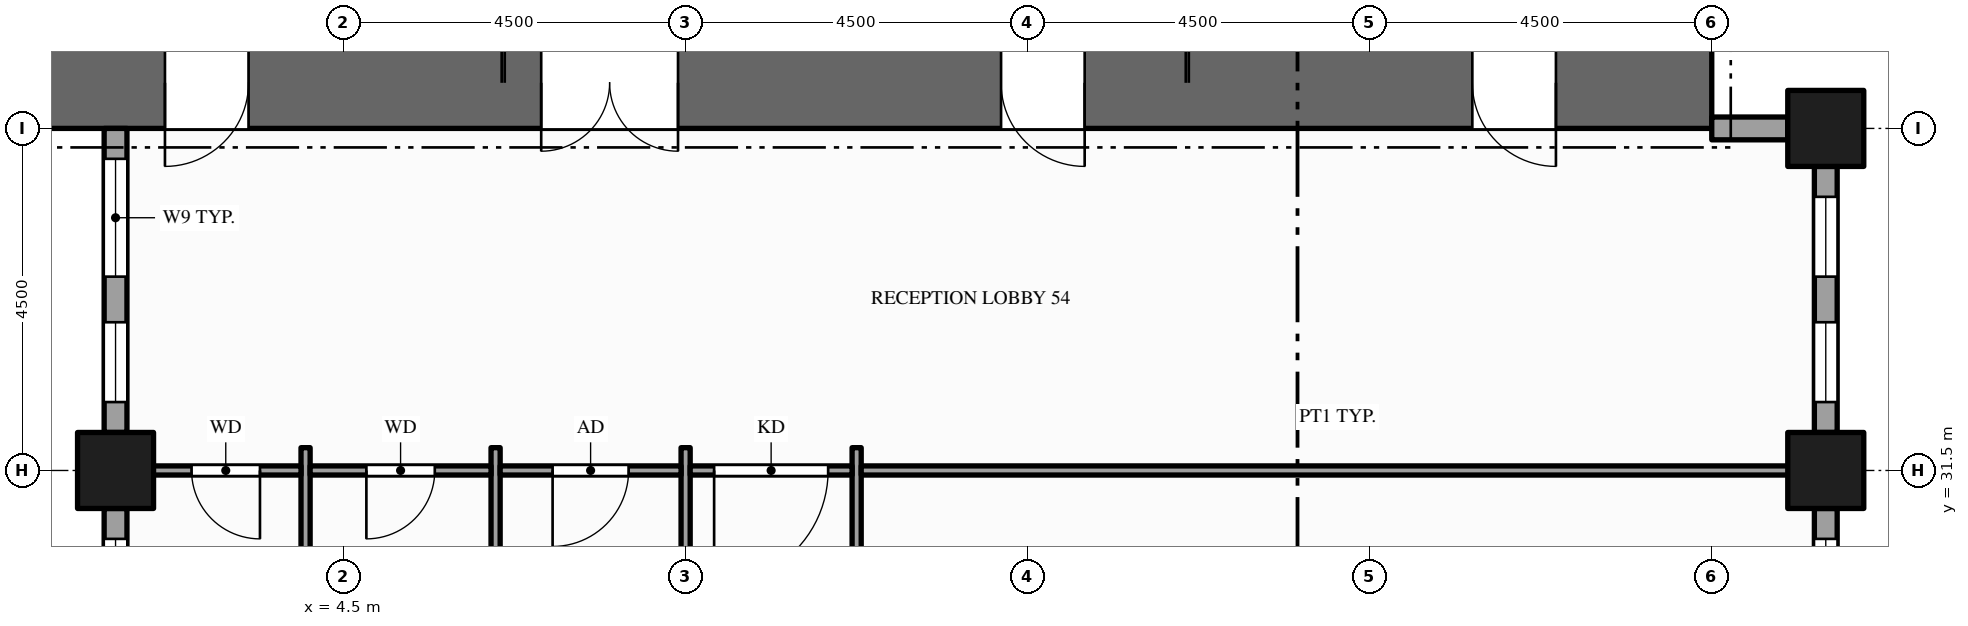
"""IFC4 building model, lengths in metres.
Left out: names, types, materials, properties, quantities, classifications, styles, units other than length and angle.
Written with IfcOpenShell. Run it as: python <this file> out.ifc"""

import sys

from ifc_helpers import new_model, si_unit, direction, frame, frame_2d, origin, origin_2d, place, context, subcontext, project, spatial, rectangle, hollow_rectangle, extrude, element, fill, save


model = new_model("IFC4")
c1 = context("Model", 3, precision=1e-05, world=origin(), true_north=direction((0.0, 1.0)))
c2 = subcontext(c1, "Body", "Model", "MODEL_VIEW")
j1 = project(units=[si_unit("LENGTHUNIT", "METRE"), si_unit("PLANEANGLEUNIT", "RADIAN")], contexts=[c1])
p1 = place(None, origin())
s1 = spatial("IfcSite", under=j1, at=p1, CompositionType="ELEMENT")
p2 = place(p1, origin())
s2 = spatial("IfcBuilding", under=s1, at=p2, CompositionType="ELEMENT")
p3 = place(p2, frame((0.0, 0.0, 123.0)))
s3 = spatial("IfcBuildingStorey", under=s2, at=p3, CompositionType="ELEMENT", Elevation=123.0)
p4 = place(p3, frame((0.0, 36.6, -0.15), z_axis=(0.0, 0.0, 1.0), x_axis=(1.0, 0.0, 0.0)))
e1 = element("IfcWall", 1, at=p4, inside=s3, PredefinedType="SHEAR", context=c2, shape_type="SweptSolid", body=[
    extrude(rectangle(XDim=22.5, YDim=1.2, at=frame_2d((11.25, 0.0))), origin(), (0.0, 0.0, 1.0), 4.0),
])
p5 = place(p4, frame((7.1, 0.0, 0.15)))
e2 = element("IfcOpeningElement", 2, at=p5, cuts=e1, PredefinedType="OPENING", context=c2, shape_type="SweptSolid", body=[
    extrude(rectangle(XDim=1.8, YDim=2.1, at=frame_2d((0.9, 1.05))), frame((0.0, 0.61, 0.0), z_axis=(0.0, -1.0, 0.0), x_axis=(1.0, 0.0, 0.0)), (0.0, 0.0, 1.0), 1.22),
])
p6 = place(p4, frame((13.15, 0.0, 0.15)))
e3 = element("IfcOpeningElement", 3, at=p6, cuts=e1, PredefinedType="OPENING", context=c2, shape_type="SweptSolid", body=[
    extrude(rectangle(XDim=1.1, YDim=2.1, at=frame_2d((0.55, 1.05))), frame((0.0, 0.61, 0.0), z_axis=(0.0, -1.0, 0.0), x_axis=(1.0, 0.0, 0.0)), (0.0, 0.0, 1.0), 1.22),
])
p7 = place(p4, frame((2.15, 0.0, 0.15)))
e4 = element("IfcOpeningElement", 4, at=p7, cuts=e1, PredefinedType="OPENING", context=c2, shape_type="SweptSolid", body=[
    extrude(rectangle(XDim=1.1, YDim=2.1, at=frame_2d((0.55, 1.05))), frame((0.0, 0.61, 0.0), z_axis=(0.0, -1.0, 0.0), x_axis=(1.0, 0.0, 0.0)), (0.0, 0.0, 1.0), 1.22),
])
p8 = place(p4, frame((19.35, 0.0, 0.15)))
e5 = element("IfcOpeningElement", 5, at=p8, cuts=e1, PredefinedType="OPENING", context=c2, shape_type="SweptSolid", body=[
    extrude(rectangle(XDim=1.1, YDim=2.1, at=frame_2d((0.55, 1.05))), frame((0.0, 0.61, 0.0), z_axis=(0.0, -1.0, 0.0), x_axis=(1.0, 0.0, 0.0)), (0.0, 0.0, 1.0), 1.22),
])
for number, where, z_axis, x_axis in (
    (6, (1.5, 31.5, -0.15), (0.0, 0.0, 1.0), (1.0, 0.0, 0.0)),
    (7, (24.0, 31.5, -0.15), (0.0, 0.0, 1.0), (1.0, 0.0, 0.0)),
    (8, (24.0, 36.0, -0.15), (0.0, 0.0, 1.0), (1.0, 0.0, 0.0)),
):
    element("IfcColumn", number, at=place(p3, frame(where, z_axis=z_axis, x_axis=x_axis)), inside=s3, PredefinedType="COLUMN", context=c2, shape_type="SweptSolid", body=[
        extrude(hollow_rectangle(XDim=1.0, YDim=1.0, WallThickness=0.05, at=origin_2d()), origin(), (0.0, 0.0, 1.0), 4.0),
    ])
p9 = place(p3, frame((24.0, 26.0, 0.0), z_axis=(0.0, 0.0, 1.0), x_axis=(0.0, 1.0, 0.0)))
e9 = element("IfcWall", 9, at=p9, inside=s3, PredefinedType="STANDARD", context=c2, shape_type="SweptSolid", body=[
    extrude(rectangle(XDim=5.0, YDim=0.3, at=frame_2d((2.5, 0.0))), origin(), (0.0, 0.0, 1.0), 3.154),
])
p10 = place(p9, frame((1.3, 0.0, 0.9)))
e10 = element("IfcOpeningElement", 10, at=p10, cuts=e9, PredefinedType="OPENING", context=c2, shape_type="SweptSolid", body=[
    extrude(rectangle(XDim=1.65, YDim=2.0, at=frame_2d((0.825, 1.0))), frame((0.0, 0.16, 0.0), z_axis=(0.0, -1.0, 0.0), x_axis=(1.0, 0.0, 0.0)), (0.0, 0.0, 1.0), 0.32),
])
p11 = place(p9, frame((3.55, 0.0, 0.9)))
e11 = element("IfcOpeningElement", 11, at=p11, cuts=e9, PredefinedType="OPENING", context=c2, shape_type="SweptSolid", body=[
    extrude(rectangle(XDim=1.05, YDim=2.0, at=frame_2d((0.525, 1.0))), frame((0.0, 0.16, 0.0), z_axis=(0.0, -1.0, 0.0), x_axis=(1.0, 0.0, 0.0)), (0.0, 0.0, 1.0), 0.32),
])
p12 = place(p3, frame((24.0, 32.0, 0.0), z_axis=(0.0, 0.0, 1.0), x_axis=(0.0, 1.0, 0.0)))
e12 = element("IfcWall", 12, at=p12, inside=s3, PredefinedType="STANDARD", context=c2, shape_type="SweptSolid", body=[
    extrude(rectangle(XDim=3.5, YDim=0.3, at=frame_2d((1.75, 0.0))), origin(), (0.0, 0.0, 1.0), 3.154),
])
p13 = place(p12, frame((0.4, 0.0, 0.9)))
e13 = element("IfcOpeningElement", 13, at=p13, cuts=e12, PredefinedType="OPENING", context=c2, shape_type="SweptSolid", body=[
    extrude(rectangle(XDim=1.05, YDim=2.0, at=frame_2d((0.525, 1.0))), frame((0.0, 0.16, 0.0), z_axis=(0.0, -1.0, 0.0), x_axis=(1.0, 0.0, 0.0)), (0.0, 0.0, 1.0), 0.32),
])
p14 = place(p12, frame((2.05, 0.0, 0.9)))
e14 = element("IfcOpeningElement", 14, at=p14, cuts=e12, PredefinedType="OPENING", context=c2, shape_type="SweptSolid", body=[
    extrude(rectangle(XDim=1.05, YDim=2.0, at=frame_2d((0.525, 1.0))), frame((0.0, 0.16, 0.0), z_axis=(0.0, -1.0, 0.0), x_axis=(1.0, 0.0, 0.0)), (0.0, 0.0, 1.0), 0.32),
])
p15 = place(p3, frame((23.5, 36.0, 0.0), z_axis=(0.0, 0.0, 1.0), x_axis=(-1.0, 0.0, 0.0)))
e15 = element("IfcWall", 15, at=p15, inside=s3, PredefinedType="STANDARD", context=c2, shape_type="SweptSolid", body=[
    extrude(rectangle(XDim=1.0, YDim=0.3, at=frame_2d((0.5, 0.0))), origin(), (0.0, 0.0, 1.0), 2.938),
])
p16 = place(p3, frame((1.5, 36.0, 0.0), z_axis=(0.0, 0.0, 1.0), x_axis=(0.0, -1.0, 0.0)))
e16 = element("IfcWall", 16, at=p16, inside=s3, PredefinedType="STANDARD", context=c2, shape_type="SweptSolid", body=[
    extrude(rectangle(XDim=4.0, YDim=0.3, at=frame_2d((2.0, 0.0))), origin(), (0.0, 0.0, 1.0), 3.154),
])
p17 = place(p16, frame((0.4, 0.0, 0.9)))
e17 = element("IfcOpeningElement", 17, at=p17, cuts=e16, PredefinedType="OPENING", context=c2, shape_type="SweptSolid", body=[
    extrude(rectangle(XDim=1.55, YDim=2.0, at=frame_2d((0.775, 1.0))), frame((0.0, 0.16, 0.0), z_axis=(0.0, -1.0, 0.0), x_axis=(1.0, 0.0, 0.0)), (0.0, 0.0, 1.0), 0.32),
])
p18 = place(p16, frame((2.55, 0.0, 0.9)))
e18 = element("IfcOpeningElement", 18, at=p18, cuts=e16, PredefinedType="OPENING", context=c2, shape_type="SweptSolid", body=[
    extrude(rectangle(XDim=1.05, YDim=2.0, at=frame_2d((0.525, 1.0))), frame((0.0, 0.16, 0.0), z_axis=(0.0, -1.0, 0.0), x_axis=(1.0, 0.0, 0.0)), (0.0, 0.0, 1.0), 0.32),
])
p19 = place(p3, frame((1.5, 31.0, 0.0), z_axis=(0.0, 0.0, 1.0), x_axis=(0.0, -1.0, 0.0)))
e19 = element("IfcWall", 19, at=p19, inside=s3, PredefinedType="STANDARD", context=c2, shape_type="SweptSolid", body=[
    extrude(rectangle(XDim=3.5, YDim=0.3, at=frame_2d((1.75, 0.0))), origin(), (0.0, 0.0, 1.0), 3.154),
])
p20 = place(p19, frame((0.4, 0.0, 0.9)))
e20 = element("IfcOpeningElement", 20, at=p20, cuts=e19, PredefinedType="OPENING", context=c2, shape_type="SweptSolid", body=[
    extrude(rectangle(XDim=1.05, YDim=2.0, at=frame_2d((0.525, 1.0))), frame((0.0, 0.16, 0.0), z_axis=(0.0, -1.0, 0.0), x_axis=(1.0, 0.0, 0.0)), (0.0, 0.0, 1.0), 0.32),
])
p21 = place(p19, frame((2.05, 0.0, 0.9)))
e21 = element("IfcOpeningElement", 21, at=p21, cuts=e19, PredefinedType="OPENING", context=c2, shape_type="SweptSolid", body=[
    extrude(rectangle(XDim=1.05, YDim=2.0, at=frame_2d((0.525, 1.0))), frame((0.0, 0.16, 0.0), z_axis=(0.0, -1.0, 0.0), x_axis=(1.0, 0.0, 0.0)), (0.0, 0.0, 1.0), 0.32),
])
for number, where, z_axis, x_axis in (
    (22, (4.0, 26.7, 0.0), (0.0, 0.0, 1.0), (0.0, 1.0, 0.0)),
    (23, (6.5, 26.7, 0.0), (0.0, 0.0, 1.0), (0.0, 1.0, 0.0)),
):
    element("IfcWall", number, at=place(p3, frame(where, z_axis=z_axis, x_axis=x_axis)), inside=s3, PredefinedType="PARTITIONING", context=c2, shape_type="SweptSolid", body=[
        extrude(rectangle(XDim=5.1, YDim=0.12, at=frame_2d((2.55, 0.0))), origin(), (0.0, 0.0, 1.0), 3.85),
    ])
p22 = place(p3, frame((9.0, 13.2, 0.0), z_axis=(0.0, 0.0, 1.0), x_axis=(0.0, 1.0, 0.0)))
e24 = element("IfcWall", 24, at=p22, inside=s3, PredefinedType="PARTITIONING", context=c2, shape_type="SweptSolid", body=[
    extrude(rectangle(XDim=18.6, YDim=0.12, at=frame_2d((9.3, 0.0))), origin(), (0.0, 0.0, 1.0), 2.6),
])
p23 = place(p22, frame((3.175, 0.0, 0.0)))
e25 = element("IfcOpeningElement", 25, at=p23, cuts=e24, PredefinedType="OPENING", context=c2, shape_type="SweptSolid", body=[
    extrude(rectangle(XDim=1.0, YDim=2.1, at=frame_2d((0.5, 1.05))), frame((0.0, 0.07, 0.0), z_axis=(0.0, -1.0, 0.0), x_axis=(1.0, 0.0, 0.0)), (0.0, 0.0, 1.0), 0.14),
])
p24 = place(p22, frame((9.955, 0.0, 0.0)))
e26 = element("IfcOpeningElement", 26, at=p24, cuts=e24, PredefinedType="OPENING", context=c2, shape_type="SweptSolid", body=[
    extrude(rectangle(XDim=1.0, YDim=2.1, at=frame_2d((0.5, 1.05))), frame((0.0, 0.07, 0.0), z_axis=(0.0, -1.0, 0.0), x_axis=(1.0, 0.0, 0.0)), (0.0, 0.0, 1.0), 0.14),
])
p25 = place(p3, frame((11.25, 13.2, 0.0), z_axis=(0.0, 0.0, 1.0), x_axis=(0.0, 1.0, 0.0)))
e27 = element("IfcWall", 27, at=p25, inside=s3, PredefinedType="PARTITIONING", context=c2, shape_type="SweptSolid", body=[
    extrude(rectangle(XDim=18.6, YDim=0.12, at=frame_2d((9.3, 0.0))), origin(), (0.0, 0.0, 1.0), 2.6),
])
p26 = place(p25, frame((4.2, 0.0, 0.0)))
e28 = element("IfcOpeningElement", 28, at=p26, cuts=e27, PredefinedType="OPENING", context=c2, shape_type="SweptSolid", body=[
    extrude(rectangle(XDim=1.2, YDim=2.1, at=frame_2d((0.6, 1.05))), frame((0.0, 0.07, 0.0), z_axis=(0.0, -1.0, 0.0), x_axis=(1.0, 0.0, 0.0)), (0.0, 0.0, 1.0), 0.14),
])
p27 = place(p3, frame((1.65, 31.5, 0.0), z_axis=(0.0, 0.0, 1.0), x_axis=(1.0, 0.0, 0.0)))
e29 = element("IfcWall", 29, at=p27, inside=s3, PredefinedType="PARTITIONING", context=c2, shape_type="SweptSolid", body=[
    extrude(rectangle(XDim=2.29, YDim=0.12, at=frame_2d((1.145, 0.0))), origin(), (0.0, 0.0, 1.0), 2.938),
])
p28 = place(p27, frame((0.85, 0.0, 0.0)))
e30 = element("IfcOpeningElement", 30, at=p28, cuts=e29, PredefinedType="OPENING", context=c2, shape_type="SweptSolid", body=[
    extrude(rectangle(XDim=0.9, YDim=2.1, at=frame_2d((0.45, 1.05))), frame((0.0, 0.07, 0.0), z_axis=(0.0, -1.0, 0.0), x_axis=(1.0, 0.0, 0.0)), (0.0, 0.0, 1.0), 0.14),
])
p29 = place(p3, frame((4.06, 31.5, 0.0), z_axis=(0.0, 0.0, 1.0), x_axis=(1.0, 0.0, 0.0)))
e31 = element("IfcWall", 31, at=p29, inside=s3, PredefinedType="PARTITIONING", context=c2, shape_type="SweptSolid", body=[
    extrude(rectangle(XDim=2.38, YDim=0.12, at=frame_2d((1.19, 0.0))), origin(), (0.0, 0.0, 1.0), 2.938),
])
p30 = place(p29, frame((0.74, 0.0, 0.0)))
e32 = element("IfcOpeningElement", 32, at=p30, cuts=e31, PredefinedType="OPENING", context=c2, shape_type="SweptSolid", body=[
    extrude(rectangle(XDim=0.9, YDim=2.1, at=frame_2d((0.45, 1.05))), frame((0.0, 0.07, 0.0), z_axis=(0.0, -1.0, 0.0), x_axis=(1.0, 0.0, 0.0)), (0.0, 0.0, 1.0), 0.14),
])
p31 = place(p3, frame((6.56, 31.5, 0.0), z_axis=(0.0, 0.0, 1.0), x_axis=(1.0, 0.0, 0.0)))
e33 = element("IfcWall", 33, at=p31, inside=s3, PredefinedType="PARTITIONING", context=c2, shape_type="SweptSolid", body=[
    extrude(rectangle(XDim=2.38, YDim=0.12, at=frame_2d((1.19, 0.0))), origin(), (0.0, 0.0, 1.0), 2.938),
])
p32 = place(p31, frame((0.69, 0.0, 0.0)))
e34 = element("IfcOpeningElement", 34, at=p32, cuts=e33, PredefinedType="OPENING", context=c2, shape_type="SweptSolid", body=[
    extrude(rectangle(XDim=1.0, YDim=2.1, at=frame_2d((0.5, 1.05))), frame((0.0, 0.07, 0.0), z_axis=(0.0, -1.0, 0.0), x_axis=(1.0, 0.0, 0.0)), (0.0, 0.0, 1.0), 0.14),
])
p33 = place(p3, frame((9.06, 31.5, 0.0), z_axis=(0.0, 0.0, 1.0), x_axis=(1.0, 0.0, 0.0)))
e35 = element("IfcWall", 35, at=p33, inside=s3, PredefinedType="PARTITIONING", context=c2, shape_type="SweptSolid", body=[
    extrude(rectangle(XDim=2.13, YDim=0.12, at=frame_2d((1.065, 0.0))), origin(), (0.0, 0.0, 1.0), 2.938),
])
p34 = place(p33, frame((0.315, 0.0, 0.0)))
e36 = element("IfcOpeningElement", 36, at=p34, cuts=e35, PredefinedType="OPENING", context=c2, shape_type="SweptSolid", body=[
    extrude(rectangle(XDim=1.5, YDim=2.1, at=frame_2d((0.75, 1.05))), frame((0.0, 0.07, 0.0), z_axis=(0.0, -1.0, 0.0), x_axis=(1.0, 0.0, 0.0)), (0.0, 0.0, 1.0), 0.14),
])
p35 = place(p3, frame((11.31, 31.5, 0.0), z_axis=(0.0, 0.0, 1.0), x_axis=(1.0, 0.0, 0.0)))
e37 = element("IfcWall", 37, at=p35, inside=s3, PredefinedType="PARTITIONING", context=c2, shape_type="SweptSolid", body=[
    extrude(rectangle(XDim=12.54, YDim=0.12, at=frame_2d((6.27, 0.0))), origin(), (0.0, 0.0, 1.0), 2.938),
])
p36 = place(p11, origin())
e38 = element("IfcWindow", 38, at=p36, inside=s3, PartitioningType="SINGLE_PANEL", PredefinedType="WINDOW", context=c2, shape_type="SweptSolid", body=[
    extrude(rectangle(XDim=1.05, YDim=2.0, at=frame_2d((0.525, 1.0))), frame((0.0, 0.03, 0.0), z_axis=(0.0, -1.0, 0.0), x_axis=(1.0, 0.0, 0.0)), (0.0, 0.0, 1.0), 0.06),
])
fill(e11, e38)
p37 = place(p13, origin())
e39 = element("IfcWindow", 39, at=p37, inside=s3, PartitioningType="SINGLE_PANEL", PredefinedType="WINDOW", context=c2, shape_type="SweptSolid", body=[
    extrude(rectangle(XDim=1.05, YDim=2.0, at=frame_2d((0.525, 1.0))), frame((0.0, 0.03, 0.0), z_axis=(0.0, -1.0, 0.0), x_axis=(1.0, 0.0, 0.0)), (0.0, 0.0, 1.0), 0.06),
])
fill(e13, e39)
p38 = place(p14, origin())
e40 = element("IfcWindow", 40, at=p38, inside=s3, PartitioningType="SINGLE_PANEL", PredefinedType="WINDOW", context=c2, shape_type="SweptSolid", body=[
    extrude(rectangle(XDim=1.05, YDim=2.0, at=frame_2d((0.525, 1.0))), frame((0.0, 0.03, 0.0), z_axis=(0.0, -1.0, 0.0), x_axis=(1.0, 0.0, 0.0)), (0.0, 0.0, 1.0), 0.06),
])
fill(e14, e40)
p39 = place(p17, origin())
e41 = element("IfcWindow", 41, at=p39, inside=s3, PartitioningType="SINGLE_PANEL", PredefinedType="WINDOW", context=c2, shape_type="SweptSolid", body=[
    extrude(rectangle(XDim=1.55, YDim=2.0, at=frame_2d((0.775, 1.0))), frame((0.0, 0.03, 0.0), z_axis=(0.0, -1.0, 0.0), x_axis=(1.0, 0.0, 0.0)), (0.0, 0.0, 1.0), 0.06),
])
fill(e17, e41)
p40 = place(p18, origin())
e42 = element("IfcWindow", 42, at=p40, inside=s3, PartitioningType="SINGLE_PANEL", PredefinedType="WINDOW", context=c2, shape_type="SweptSolid", body=[
    extrude(rectangle(XDim=1.05, YDim=2.0, at=frame_2d((0.525, 1.0))), frame((0.0, 0.03, 0.0), z_axis=(0.0, -1.0, 0.0), x_axis=(1.0, 0.0, 0.0)), (0.0, 0.0, 1.0), 0.06),
])
fill(e18, e42)
p41 = place(p20, origin())
e43 = element("IfcWindow", 43, at=p41, inside=s3, PartitioningType="SINGLE_PANEL", PredefinedType="WINDOW", context=c2, shape_type="SweptSolid", body=[
    extrude(rectangle(XDim=1.05, YDim=2.0, at=frame_2d((0.525, 1.0))), frame((0.0, 0.03, 0.0), z_axis=(0.0, -1.0, 0.0), x_axis=(1.0, 0.0, 0.0)), (0.0, 0.0, 1.0), 0.06),
])
fill(e20, e43)
p42 = place(p5, origin())
e44 = element("IfcDoor", 44, at=p42, inside=s3, OperationType="DOUBLE_DOOR_SINGLE_SWING", PredefinedType="DOOR", context=c2, shape_type="SweptSolid", body=[
    extrude(rectangle(XDim=1.8, YDim=2.1, at=frame_2d((0.9, 1.05))), frame((0.0, 0.025, 0.0), z_axis=(0.0, -1.0, 0.0), x_axis=(1.0, 0.0, 0.0)), (0.0, 0.0, 1.0), 0.05),
])
fill(e2, e44)
p43 = place(p6, origin())
e45 = element("IfcDoor", 45, at=p43, inside=s3, OperationType="SINGLE_SWING_RIGHT", PredefinedType="DOOR", context=c2, shape_type="SweptSolid", body=[
    extrude(rectangle(XDim=1.1, YDim=2.1, at=frame_2d((0.55, 1.05))), frame((0.0, 0.025, 0.0), z_axis=(0.0, -1.0, 0.0), x_axis=(1.0, 0.0, 0.0)), (0.0, 0.0, 1.0), 0.05),
])
fill(e3, e45)
p44 = place(p7, origin())
e46 = element("IfcDoor", 46, at=p44, inside=s3, OperationType="SINGLE_SWING_LEFT", PredefinedType="DOOR", context=c2, shape_type="SweptSolid", body=[
    extrude(rectangle(XDim=1.1, YDim=2.1, at=frame_2d((0.55, 1.05))), frame((0.0, 0.025, 0.0), z_axis=(0.0, -1.0, 0.0), x_axis=(1.0, 0.0, 0.0)), (0.0, 0.0, 1.0), 0.05),
])
fill(e4, e46)
p45 = place(p8, origin())
e47 = element("IfcDoor", 47, at=p45, inside=s3, OperationType="SINGLE_SWING_RIGHT", PredefinedType="DOOR", context=c2, shape_type="SweptSolid", body=[
    extrude(rectangle(XDim=1.1, YDim=2.1, at=frame_2d((0.55, 1.05))), frame((0.0, 0.025, 0.0), z_axis=(0.0, -1.0, 0.0), x_axis=(1.0, 0.0, 0.0)), (0.0, 0.0, 1.0), 0.05),
])
fill(e5, e47)
p46 = place(p34, origin())
e48 = element("IfcDoor", 48, at=p46, inside=s3, OperationType="SINGLE_SWING_LEFT", PredefinedType="DOOR", context=c2, shape_type="SweptSolid", body=[
    extrude(rectangle(XDim=1.5, YDim=2.1, at=frame_2d((0.75, 1.05))), frame((0.0, 0.025, 0.0), z_axis=(0.0, -1.0, 0.0), x_axis=(1.0, 0.0, 0.0)), (0.0, 0.0, 1.0), 0.05),
])
fill(e36, e48)
p47 = place(p28, origin())
e49 = element("IfcDoor", 49, at=p47, inside=s3, OperationType="SINGLE_SWING_RIGHT", PredefinedType="DOOR", context=c2, shape_type="SweptSolid", body=[
    extrude(rectangle(XDim=0.9, YDim=2.1, at=frame_2d((0.45, 1.05))), frame((0.0, 0.025, 0.0), z_axis=(0.0, -1.0, 0.0), x_axis=(1.0, 0.0, 0.0)), (0.0, 0.0, 1.0), 0.05),
])
fill(e30, e49)
p48 = place(p30, origin())
e50 = element("IfcDoor", 50, at=p48, inside=s3, OperationType="SINGLE_SWING_LEFT", PredefinedType="DOOR", context=c2, shape_type="SweptSolid", body=[
    extrude(rectangle(XDim=0.9, YDim=2.1, at=frame_2d((0.45, 1.05))), frame((0.0, 0.025, 0.0), z_axis=(0.0, -1.0, 0.0), x_axis=(1.0, 0.0, 0.0)), (0.0, 0.0, 1.0), 0.05),
])
fill(e32, e50)
p49 = place(p32, origin())
e51 = element("IfcDoor", 51, at=p49, inside=s3, OperationType="SINGLE_SWING_LEFT", PredefinedType="DOOR", context=c2, shape_type="SweptSolid", body=[
    extrude(rectangle(XDim=1.0, YDim=2.1, at=frame_2d((0.5, 1.05))), frame((0.0, 0.025, 0.0), z_axis=(0.0, -1.0, 0.0), x_axis=(1.0, 0.0, 0.0)), (0.0, 0.0, 1.0), 0.05),
])
fill(e34, e51)
save(model, sys.argv[1])
